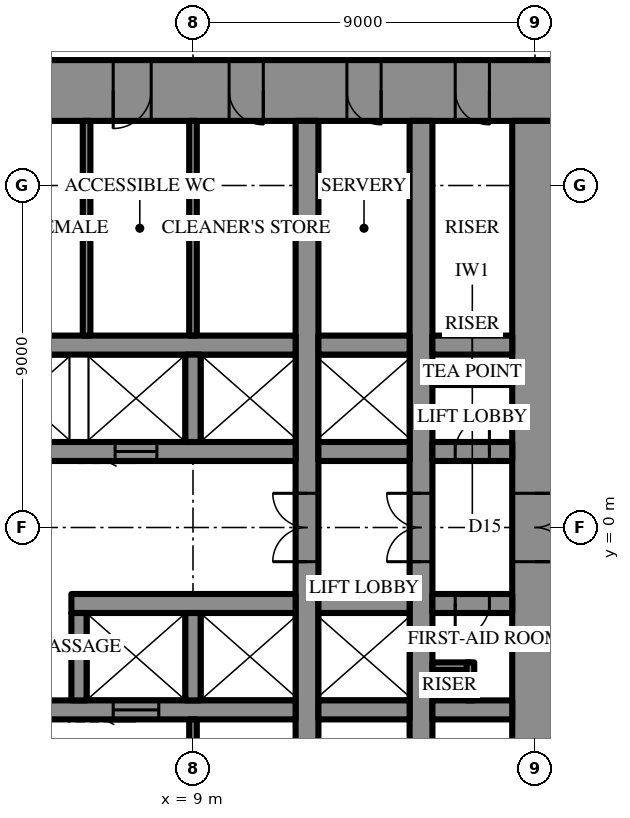
"""IFC4 building model, lengths in metres.
Left out: names, types, materials, properties, quantities, classifications, styles, units other than length and angle.
Written with IfcOpenShell. Run it as: python <this file> out.ifc"""

import sys

from ifc_helpers import new_model, si_unit, direction, frame, frame_2d, origin, place, context, subcontext, project, spatial, rectangle, extrude, element, fill, save


model = new_model("IFC4")
c1 = context("Model", 3, precision=1e-05, world=origin(), true_north=direction((0.0, 1.0)))
c2 = subcontext(c1, "Body", "Model", "MODEL_VIEW")
j1 = project(units=[si_unit("LENGTHUNIT", "METRE"), si_unit("PLANEANGLEUNIT", "RADIAN")], contexts=[c1])
p1 = place(None, origin())
s1 = spatial("IfcSite", under=j1, at=p1, CompositionType="ELEMENT")
p2 = place(p1, origin())
s2 = spatial("IfcBuilding", under=s1, at=p2, CompositionType="ELEMENT")
p3 = place(p2, frame((0.0, 0.0, 157.3)))
s3 = spatial("IfcBuildingStorey", under=s2, at=p3, CompositionType="ELEMENT", Elevation=157.3)
p4 = place(p3, frame((-18.6, 11.5, 0.0), z_axis=(0.0, 0.0, 1.0), x_axis=(1.0, 0.0, 0.0)))
e1 = element("IfcWall", 1, at=p4, inside=s3, PredefinedType="SHEAR", context=c2, shape_type="SweptSolid", body=[
    extrude(rectangle(XDim=37.2, YDim=1.6, at=frame_2d((18.6, 0.0))), origin(), (0.0, 0.0, 1.0), 4.2),
])
p5 = place(p4, frame((19.45, 0.0, 0.0)))
e2 = element("IfcOpeningElement", 2, at=p5, cuts=e1, PredefinedType="OPENING", context=c2, shape_type="SweptSolid", body=[
    extrude(rectangle(XDim=0.9, YDim=2.2, at=frame_2d((0.45, 1.1))), frame((0.0, 0.81, 0.0), z_axis=(0.0, -1.0, 0.0), x_axis=(1.0, 0.0, 0.0)), (0.0, 0.0, 1.0), 1.62),
])
p6 = place(p4, frame((22.45, 0.0, 0.0)))
e3 = element("IfcOpeningElement", 3, at=p6, cuts=e1, PredefinedType="OPENING", context=c2, shape_type="SweptSolid", body=[
    extrude(rectangle(XDim=0.9, YDim=2.2, at=frame_2d((0.45, 1.1))), frame((0.0, 0.81, 0.0), z_axis=(0.0, -1.0, 0.0), x_axis=(1.0, 0.0, 0.0)), (0.0, 0.0, 1.0), 1.62),
])
p7 = place(p4, frame((25.5, 0.0, 0.0)))
e4 = element("IfcOpeningElement", 4, at=p7, cuts=e1, PredefinedType="OPENING", context=c2, shape_type="SweptSolid", body=[
    extrude(rectangle(XDim=1.0, YDim=2.2, at=frame_2d((0.5, 1.1))), frame((0.0, 0.81, 0.0), z_axis=(0.0, -1.0, 0.0), x_axis=(1.0, 0.0, 0.0)), (0.0, 0.0, 1.0), 1.62),
])
p8 = place(p4, frame((1.8, 0.0, 0.0)))
e5 = element("IfcOpeningElement", 5, at=p8, cuts=e1, PredefinedType="OPENING", context=c2, shape_type="SweptSolid", body=[
    extrude(rectangle(XDim=0.9, YDim=2.2, at=frame_2d((0.45, 1.1))), frame((0.0, 0.81, 0.0), z_axis=(0.0, -1.0, 0.0), x_axis=(1.0, 0.0, 0.0)), (0.0, 0.0, 1.0), 1.62),
])
p9 = place(p4, frame((4.65, 0.0, 0.0)))
e6 = element("IfcOpeningElement", 6, at=p9, cuts=e1, PredefinedType="OPENING", context=c2, shape_type="SweptSolid", body=[
    extrude(rectangle(XDim=0.9, YDim=2.2, at=frame_2d((0.45, 1.1))), frame((0.0, 0.81, 0.0), z_axis=(0.0, -1.0, 0.0), x_axis=(1.0, 0.0, 0.0)), (0.0, 0.0, 1.0), 1.62),
])
p10 = place(p4, frame((7.75, 0.0, 0.0)))
e7 = element("IfcOpeningElement", 7, at=p10, cuts=e1, PredefinedType="OPENING", context=c2, shape_type="SweptSolid", body=[
    extrude(rectangle(XDim=0.9, YDim=2.2, at=frame_2d((0.45, 1.1))), frame((0.0, 0.81, 0.0), z_axis=(0.0, -1.0, 0.0), x_axis=(1.0, 0.0, 0.0)), (0.0, 0.0, 1.0), 1.62),
])
p11 = place(p4, frame((28.55, 0.0, 0.0)))
e8 = element("IfcOpeningElement", 8, at=p11, cuts=e1, PredefinedType="OPENING", context=c2, shape_type="SweptSolid", body=[
    extrude(rectangle(XDim=0.9, YDim=2.2, at=frame_2d((0.45, 1.1))), frame((0.0, 0.81, 0.0), z_axis=(0.0, -1.0, 0.0), x_axis=(1.0, 0.0, 0.0)), (0.0, 0.0, 1.0), 1.62),
])
p12 = place(p4, frame((31.65, 0.0, 0.0)))
e9 = element("IfcOpeningElement", 9, at=p12, cuts=e1, PredefinedType="OPENING", context=c2, shape_type="SweptSolid", body=[
    extrude(rectangle(XDim=0.9, YDim=2.2, at=frame_2d((0.45, 1.1))), frame((0.0, 0.81, 0.0), z_axis=(0.0, -1.0, 0.0), x_axis=(1.0, 0.0, 0.0)), (0.0, 0.0, 1.0), 1.62),
])
p13 = place(p4, frame((34.5, 0.0, 0.0)))
e10 = element("IfcOpeningElement", 10, at=p13, cuts=e1, PredefinedType="OPENING", context=c2, shape_type="SweptSolid", body=[
    extrude(rectangle(XDim=0.9, YDim=2.2, at=frame_2d((0.45, 1.1))), frame((0.0, 0.81, 0.0), z_axis=(0.0, -1.0, 0.0), x_axis=(1.0, 0.0, 0.0)), (0.0, 0.0, 1.0), 1.62),
])
p14 = place(p3, frame((18.0, -10.7, 0.0), z_axis=(0.0, 0.0, 1.0), x_axis=(0.0, 1.0, 0.0)))
e11 = element("IfcWall", 11, at=p14, inside=s3, PredefinedType="SHEAR", context=c2, shape_type="SweptSolid", body=[
    extrude(rectangle(XDim=21.4, YDim=1.2, at=frame_2d((10.7, 0.0))), origin(), (0.0, 0.0, 1.0), 4.2),
])
p15 = place(p14, frame((9.8, 0.0, 0.0)))
e12 = element("IfcOpeningElement", 12, at=p15, cuts=e11, PredefinedType="OPENING", context=c2, shape_type="SweptSolid", body=[
    extrude(rectangle(XDim=1.8, YDim=2.4, at=frame_2d((0.9, 1.2))), frame((0.0, 0.61, 0.0), z_axis=(0.0, -1.0, 0.0), x_axis=(1.0, 0.0, 0.0)), (0.0, 0.0, 1.0), 1.22),
])
p16 = place(p3, frame((12.0, -10.7, 0.0), z_axis=(0.0, 0.0, 1.0), x_axis=(0.0, 1.0, 0.0)))
e13 = element("IfcWall", 13, at=p16, inside=s3, PredefinedType="SHEAR", context=c2, shape_type="SweptSolid", body=[
    extrude(rectangle(XDim=21.4, YDim=0.6, at=frame_2d((10.7, 0.0))), origin(), (0.0, 0.0, 1.0), 4.2),
])
p17 = place(p16, frame((9.8, 0.0, 0.0)))
e14 = element("IfcOpeningElement", 14, at=p17, cuts=e13, PredefinedType="OPENING", context=c2, shape_type="SweptSolid", body=[
    extrude(rectangle(XDim=1.8, YDim=2.4, at=frame_2d((0.9, 1.2))), frame((0.0, 0.31, 0.0), z_axis=(0.0, -1.0, 0.0), x_axis=(1.0, 0.0, 0.0)), (0.0, 0.0, 1.0), 0.62),
])
p18 = place(p3, frame((15.0, -10.7, 0.0), z_axis=(0.0, 0.0, 1.0), x_axis=(0.0, 1.0, 0.0)))
e15 = element("IfcWall", 15, at=p18, inside=s3, PredefinedType="SHEAR", context=c2, shape_type="SweptSolid", body=[
    extrude(rectangle(XDim=21.4, YDim=0.6, at=frame_2d((10.7, 0.0))), origin(), (0.0, 0.0, 1.0), 4.2),
])
p19 = place(p18, frame((9.8, 0.0, 0.0)))
e16 = element("IfcOpeningElement", 16, at=p19, cuts=e15, PredefinedType="OPENING", context=c2, shape_type="SweptSolid", body=[
    extrude(rectangle(XDim=1.8, YDim=2.4, at=frame_2d((0.9, 1.2))), frame((0.0, 0.31, 0.0), z_axis=(0.0, -1.0, 0.0), x_axis=(1.0, 0.0, 0.0)), (0.0, 0.0, 1.0), 0.62),
])
p20 = place(p3, frame((-3.2, 2.0, 0.0), z_axis=(0.0, 0.0, 1.0), x_axis=(1.0, 0.0, 0.0)))
e17 = element("IfcWall", 17, at=p20, inside=s3, PredefinedType="SHEAR", context=c2, shape_type="SweptSolid", body=[
    extrude(rectangle(XDim=14.9, YDim=0.5, at=frame_2d((7.45, 0.0))), origin(), (0.0, 0.0, 1.0), 4.2),
])
p21 = place(p20, frame((1.15, 0.0, 0.0)))
e18 = element("IfcOpeningElement", 18, at=p21, cuts=e17, PredefinedType="OPENING", context=c2, shape_type="SweptSolid", body=[
    extrude(rectangle(XDim=1.1, YDim=2.2, at=frame_2d((0.55, 1.1))), frame((0.0, 0.26, 0.0), z_axis=(0.0, -1.0, 0.0), x_axis=(1.0, 0.0, 0.0)), (0.0, 0.0, 1.0), 0.52),
])
p22 = place(p20, frame((4.15, 0.0, 0.0)))
e19 = element("IfcOpeningElement", 19, at=p22, cuts=e17, PredefinedType="OPENING", context=c2, shape_type="SweptSolid", body=[
    extrude(rectangle(XDim=1.1, YDim=2.2, at=frame_2d((0.55, 1.1))), frame((0.0, 0.26, 0.0), z_axis=(0.0, -1.0, 0.0), x_axis=(1.0, 0.0, 0.0)), (0.0, 0.0, 1.0), 0.52),
])
p23 = place(p20, frame((7.15, 0.0, 0.0)))
e20 = element("IfcOpeningElement", 20, at=p23, cuts=e17, PredefinedType="OPENING", context=c2, shape_type="SweptSolid", body=[
    extrude(rectangle(XDim=1.1, YDim=2.2, at=frame_2d((0.55, 1.1))), frame((0.0, 0.26, 0.0), z_axis=(0.0, -1.0, 0.0), x_axis=(1.0, 0.0, 0.0)), (0.0, 0.0, 1.0), 0.52),
])
p24 = place(p20, frame((10.15, 0.0, 0.0)))
e21 = element("IfcOpeningElement", 21, at=p24, cuts=e17, PredefinedType="OPENING", context=c2, shape_type="SweptSolid", body=[
    extrude(rectangle(XDim=1.1, YDim=2.2, at=frame_2d((0.55, 1.1))), frame((0.0, 0.26, 0.0), z_axis=(0.0, -1.0, 0.0), x_axis=(1.0, 0.0, 0.0)), (0.0, 0.0, 1.0), 0.52),
])
p25 = place(p3, frame((12.3, 2.0, 0.0), z_axis=(0.0, 0.0, 1.0), x_axis=(1.0, 0.0, 0.0)))
e22 = element("IfcWall", 22, at=p25, inside=s3, PredefinedType="SHEAR", context=c2, shape_type="SweptSolid", body=[
    extrude(rectangle(XDim=2.4, YDim=0.5, at=frame_2d((1.2, 0.0))), origin(), (0.0, 0.0, 1.0), 4.2),
])
p26 = place(p3, frame((15.3, 2.0, 0.0), z_axis=(0.0, 0.0, 1.0), x_axis=(1.0, 0.0, 0.0)))
e23 = element("IfcWall", 23, at=p26, inside=s3, PredefinedType="SHEAR", context=c2, shape_type="SweptSolid", body=[
    extrude(rectangle(XDim=2.1, YDim=0.5, at=frame_2d((1.05, 0.0))), origin(), (0.0, 0.0, 1.0), 4.2),
])
p27 = place(p26, frame((0.6, 0.0, 0.0)))
e24 = element("IfcOpeningElement", 24, at=p27, cuts=e23, PredefinedType="OPENING", context=c2, shape_type="SweptSolid", body=[
    extrude(rectangle(XDim=0.9, YDim=2.2, at=frame_2d((0.45, 1.1))), frame((0.0, 0.26, 0.0), z_axis=(0.0, -1.0, 0.0), x_axis=(1.0, 0.0, 0.0)), (0.0, 0.0, 1.0), 0.52),
])
p28 = place(p3, frame((-11.7, 4.8, 0.0), z_axis=(0.0, 0.0, 1.0), x_axis=(1.0, 0.0, 0.0)))
e25 = element("IfcWall", 25, at=p28, inside=s3, PredefinedType="SHEAR", context=c2, shape_type="SweptSolid", body=[
    extrude(rectangle(XDim=23.4, YDim=0.5, at=frame_2d((11.7, 0.0))), origin(), (0.0, 0.0, 1.0), 4.2),
])
p29 = place(p28, frame((6.6, 0.0, 0.0)))
e26 = element("IfcOpeningElement", 26, at=p29, cuts=e25, PredefinedType="OPENING", context=c2, shape_type="SweptSolid", body=[
    extrude(rectangle(XDim=1.2, YDim=2.2, at=frame_2d((0.6, 1.1))), frame((0.0, 0.26, 0.0), z_axis=(0.0, -1.0, 0.0), x_axis=(1.0, 0.0, 0.0)), (0.0, 0.0, 1.0), 0.52),
])
p30 = place(p28, frame((3.6, 0.0, 0.0)))
e27 = element("IfcOpeningElement", 27, at=p30, cuts=e25, PredefinedType="OPENING", context=c2, shape_type="SweptSolid", body=[
    extrude(rectangle(XDim=1.2, YDim=2.2, at=frame_2d((0.6, 1.1))), frame((0.0, 0.26, 0.0), z_axis=(0.0, -1.0, 0.0), x_axis=(1.0, 0.0, 0.0)), (0.0, 0.0, 1.0), 0.52),
])
p31 = place(p3, frame((12.3, 4.8, 0.0), z_axis=(0.0, 0.0, 1.0), x_axis=(1.0, 0.0, 0.0)))
e28 = element("IfcWall", 28, at=p31, inside=s3, PredefinedType="SHEAR", context=c2, shape_type="SweptSolid", body=[
    extrude(rectangle(XDim=2.4, YDim=0.5, at=frame_2d((1.2, 0.0))), origin(), (0.0, 0.0, 1.0), 4.2),
])
p32 = place(p3, frame((15.3, 4.8, 0.0), z_axis=(0.0, 0.0, 1.0), x_axis=(1.0, 0.0, 0.0)))
e29 = element("IfcWall", 29, at=p32, inside=s3, PredefinedType="SHEAR", context=c2, shape_type="SweptSolid", body=[
    extrude(rectangle(XDim=2.1, YDim=0.5, at=frame_2d((1.05, 0.0))), origin(), (0.0, 0.0, 1.0), 4.2),
])
p33 = place(p3, frame((9.0, 2.25, 0.0), z_axis=(0.0, 0.0, 1.0), x_axis=(0.0, 1.0, 0.0)))
e30 = element("IfcWall", 30, at=p33, inside=s3, PredefinedType="SHEAR", context=c2, shape_type="SweptSolid", body=[
    extrude(rectangle(XDim=2.3, YDim=0.4, at=frame_2d((1.15, 0.0))), origin(), (0.0, 0.0, 1.0), 4.2),
])
p34 = place(p3, frame((17.4, -2.0, 0.0), z_axis=(0.0, 0.0, 1.0), x_axis=(-1.0, 0.0, 0.0)))
e31 = element("IfcWall", 31, at=p34, inside=s3, PredefinedType="SHEAR", context=c2, shape_type="SweptSolid", body=[
    extrude(rectangle(XDim=2.1, YDim=0.5, at=frame_2d((1.05, 0.0))), origin(), (0.0, 0.0, 1.0), 4.2),
])
p35 = place(p34, frame((0.6, 0.0, 0.0)))
e32 = element("IfcOpeningElement", 32, at=p35, cuts=e31, PredefinedType="OPENING", context=c2, shape_type="SweptSolid", body=[
    extrude(rectangle(XDim=0.9, YDim=2.2, at=frame_2d((0.45, 1.1))), frame((0.0, 0.26, 0.0), z_axis=(0.0, -1.0, 0.0), x_axis=(1.0, 0.0, 0.0)), (0.0, 0.0, 1.0), 0.52),
])
p36 = place(p3, frame((14.7, -2.0, 0.0), z_axis=(0.0, 0.0, 1.0), x_axis=(-1.0, 0.0, 0.0)))
e33 = element("IfcWall", 33, at=p36, inside=s3, PredefinedType="SHEAR", context=c2, shape_type="SweptSolid", body=[
    extrude(rectangle(XDim=2.4, YDim=0.5, at=frame_2d((1.2, 0.0))), origin(), (0.0, 0.0, 1.0), 4.2),
])
p37 = place(p3, frame((11.7, -2.0, 0.0), z_axis=(0.0, 0.0, 1.0), x_axis=(-1.0, 0.0, 0.0)))
e34 = element("IfcWall", 34, at=p37, inside=s3, PredefinedType="SHEAR", context=c2, shape_type="SweptSolid", body=[
    extrude(rectangle(XDim=5.9, YDim=0.5, at=frame_2d((2.95, 0.0))), origin(), (0.0, 0.0, 1.0), 4.2),
])
p38 = place(p3, frame((17.4, -4.8, 0.0), z_axis=(0.0, 0.0, 1.0), x_axis=(-1.0, 0.0, 0.0)))
e35 = element("IfcWall", 35, at=p38, inside=s3, PredefinedType="SHEAR", context=c2, shape_type="SweptSolid", body=[
    extrude(rectangle(XDim=2.1, YDim=0.5, at=frame_2d((1.05, 0.0))), origin(), (0.0, 0.0, 1.0), 4.2),
])
p39 = place(p3, frame((14.7, -4.8, 0.0), z_axis=(0.0, 0.0, 1.0), x_axis=(-1.0, 0.0, 0.0)))
e36 = element("IfcWall", 36, at=p39, inside=s3, PredefinedType="SHEAR", context=c2, shape_type="SweptSolid", body=[
    extrude(rectangle(XDim=2.4, YDim=0.5, at=frame_2d((1.2, 0.0))), origin(), (0.0, 0.0, 1.0), 4.2),
])
p40 = place(p3, frame((11.7, -4.8, 0.0), z_axis=(0.0, 0.0, 1.0), x_axis=(-1.0, 0.0, 0.0)))
e37 = element("IfcWall", 37, at=p40, inside=s3, PredefinedType="SHEAR", context=c2, shape_type="SweptSolid", body=[
    extrude(rectangle(XDim=23.4, YDim=0.5, at=frame_2d((11.7, 0.0))), origin(), (0.0, 0.0, 1.0), 4.2),
])
p41 = place(p40, frame((6.6, 0.0, 0.0)))
e38 = element("IfcOpeningElement", 38, at=p41, cuts=e37, PredefinedType="OPENING", context=c2, shape_type="SweptSolid", body=[
    extrude(rectangle(XDim=1.2, YDim=2.2, at=frame_2d((0.6, 1.1))), frame((0.0, 0.26, 0.0), z_axis=(0.0, -1.0, 0.0), x_axis=(1.0, 0.0, 0.0)), (0.0, 0.0, 1.0), 0.52),
])
p42 = place(p40, frame((3.6, 0.0, 0.0)))
e39 = element("IfcOpeningElement", 39, at=p42, cuts=e37, PredefinedType="OPENING", context=c2, shape_type="SweptSolid", body=[
    extrude(rectangle(XDim=1.2, YDim=2.2, at=frame_2d((0.6, 1.1))), frame((0.0, 0.26, 0.0), z_axis=(0.0, -1.0, 0.0), x_axis=(1.0, 0.0, 0.0)), (0.0, 0.0, 1.0), 0.52),
])
for number, where, z_axis, x_axis in (
    (40, (9.0, -2.25, 0.0), (0.0, 0.0, 1.0), (0.0, -1.0, 0.0)),
    (41, (6.0, -2.25, 0.0), (0.0, 0.0, 1.0), (0.0, -1.0, 0.0)),
):
    element("IfcWall", number, at=place(p3, frame(where, z_axis=z_axis, x_axis=x_axis)), inside=s3, PredefinedType="SHEAR", context=c2, shape_type="SweptSolid", body=[
        extrude(rectangle(XDim=2.3, YDim=0.4, at=frame_2d((1.15, 0.0))), origin(), (0.0, 0.0, 1.0), 4.2),
    ])
for number, where, z_axis, x_axis in (
    (42, (9.0, 5.05, 0.0), (0.0, 0.0, 1.0), (0.0, 1.0, 0.0)),
    (43, (6.2, 5.05, 0.0), (0.0, 0.0, 1.0), (0.0, 1.0, 0.0)),
    (44, (9.0, -5.05, 0.0), (0.0, 0.0, 1.0), (0.0, -1.0, 0.0)),
):
    element("IfcWall", number, at=place(p3, frame(where, z_axis=z_axis, x_axis=x_axis)), inside=s3, PredefinedType="PARTITIONING", context=c2, shape_type="SweptSolid", body=[
        extrude(rectangle(XDim=5.65, YDim=0.2, at=frame_2d((2.825, 0.0))), origin(), (0.0, 0.0, 1.0), 4.0),
    ])
p43 = place(p3, frame((15.3, 3.85, 0.0), z_axis=(0.0, 0.0, 1.0), x_axis=(1.0, 0.0, 0.0)))
e45 = element("IfcWall", 45, at=p43, inside=s3, PredefinedType="PARTITIONING", context=c2, shape_type="SweptSolid", body=[
    extrude(rectangle(XDim=2.1, YDim=0.2, at=frame_2d((1.05, 0.0))), origin(), (0.0, 0.0, 1.0), 4.0),
])
for number, where, z_axis, x_axis in (
    (46, (16.3, -3.65, 0.0), (0.0, 0.0, 1.0), (-1.0, 0.0, 0.0)),
    (47, (16.3, -3.55, 0.0), (0.0, 0.0, 1.0), (0.0, -1.0, 0.0)),
):
    element("IfcWall", number, at=place(p3, frame(where, z_axis=z_axis, x_axis=x_axis)), inside=s3, PredefinedType="PARTITIONING", context=c2, shape_type="SweptSolid", body=[
        extrude(rectangle(XDim=1.0, YDim=0.2, at=frame_2d((0.5, 0.0))), origin(), (0.0, 0.0, 1.0), 4.0),
    ])
p44 = place(p15, frame((1.8, 0.0, 0.0), z_axis=(0.0, 0.0, 1.0), x_axis=(-1.0, 0.0, 0.0)))
e48 = element("IfcDoor", 48, at=p44, inside=s3, OperationType="DOUBLE_DOOR_SINGLE_SWING", PredefinedType="DOOR", context=c2, shape_type="SweptSolid", body=[
    extrude(rectangle(XDim=1.8, YDim=2.4, at=frame_2d((0.9, 1.2))), frame((0.0, 0.025, 0.0), z_axis=(0.0, -1.0, 0.0), x_axis=(1.0, 0.0, 0.0)), (0.0, 0.0, 1.0), 0.05),
])
fill(e12, e48)
p45 = place(p7, frame((1.0, 0.0, 0.0), z_axis=(0.0, 0.0, 1.0), x_axis=(-1.0, 0.0, 0.0)))
e49 = element("IfcDoor", 49, at=p45, inside=s3, OperationType="SINGLE_SWING_LEFT", PredefinedType="DOOR", context=c2, shape_type="SweptSolid", body=[
    extrude(rectangle(XDim=1.0, YDim=2.2, at=frame_2d((0.5, 1.1))), frame((0.0, 0.025, 0.0), z_axis=(0.0, -1.0, 0.0), x_axis=(1.0, 0.0, 0.0)), (0.0, 0.0, 1.0), 0.05),
])
fill(e4, e49)
p46 = place(p11, frame((0.9, 0.0, 0.0), z_axis=(0.0, 0.0, 1.0), x_axis=(-1.0, 0.0, 0.0)))
e50 = element("IfcDoor", 50, at=p46, inside=s3, OperationType="SINGLE_SWING_RIGHT", PredefinedType="DOOR", context=c2, shape_type="SweptSolid", body=[
    extrude(rectangle(XDim=0.9, YDim=2.2, at=frame_2d((0.45, 1.1))), frame((0.0, 0.025, 0.0), z_axis=(0.0, -1.0, 0.0), x_axis=(1.0, 0.0, 0.0)), (0.0, 0.0, 1.0), 0.05),
])
fill(e8, e50)
p47 = place(p12, frame((0.9, 0.0, 0.0), z_axis=(0.0, 0.0, 1.0), x_axis=(-1.0, 0.0, 0.0)))
e51 = element("IfcDoor", 51, at=p47, inside=s3, OperationType="SINGLE_SWING_RIGHT", PredefinedType="DOOR", context=c2, shape_type="SweptSolid", body=[
    extrude(rectangle(XDim=0.9, YDim=2.2, at=frame_2d((0.45, 1.1))), frame((0.0, 0.025, 0.0), z_axis=(0.0, -1.0, 0.0), x_axis=(1.0, 0.0, 0.0)), (0.0, 0.0, 1.0), 0.05),
])
fill(e9, e51)
p48 = place(p13, frame((0.9, 0.0, 0.0), z_axis=(0.0, 0.0, 1.0), x_axis=(-1.0, 0.0, 0.0)))
e52 = element("IfcDoor", 52, at=p48, inside=s3, OperationType="SINGLE_SWING_RIGHT", PredefinedType="DOOR", context=c2, shape_type="SweptSolid", body=[
    extrude(rectangle(XDim=0.9, YDim=2.2, at=frame_2d((0.45, 1.1))), frame((0.0, 0.025, 0.0), z_axis=(0.0, -1.0, 0.0), x_axis=(1.0, 0.0, 0.0)), (0.0, 0.0, 1.0), 0.05),
])
fill(e10, e52)
p49 = place(p27, origin())
e53 = element("IfcDoor", 53, at=p49, inside=s3, OperationType="SINGLE_SWING_LEFT", PredefinedType="DOOR", context=c2, shape_type="SweptSolid", body=[
    extrude(rectangle(XDim=0.9, YDim=2.2, at=frame_2d((0.45, 1.1))), frame((0.0, 0.025, 0.0), z_axis=(0.0, -1.0, 0.0), x_axis=(1.0, 0.0, 0.0)), (0.0, 0.0, 1.0), 0.05),
])
fill(e24, e53)
p50 = place(p35, origin())
e54 = element("IfcDoor", 54, at=p50, inside=s3, OperationType="SINGLE_SWING_LEFT", PredefinedType="DOOR", context=c2, shape_type="SweptSolid", body=[
    extrude(rectangle(XDim=0.9, YDim=2.2, at=frame_2d((0.45, 1.1))), frame((0.0, 0.025, 0.0), z_axis=(0.0, -1.0, 0.0), x_axis=(1.0, 0.0, 0.0)), (0.0, 0.0, 1.0), 0.05),
])
fill(e32, e54)
p51 = place(p17, origin())
e55 = element("IfcDoor", 55, at=p51, inside=s3, OperationType="DOUBLE_DOOR_SINGLE_SWING", PredefinedType="DOOR", context=c2, shape_type="SweptSolid", body=[
    extrude(rectangle(XDim=1.8, YDim=2.4, at=frame_2d((0.9, 1.2))), frame((0.0, 0.025, 0.0), z_axis=(0.0, -1.0, 0.0), x_axis=(1.0, 0.0, 0.0)), (0.0, 0.0, 1.0), 0.05),
])
fill(e14, e55)
p52 = place(p19, origin())
e56 = element("IfcDoor", 56, at=p52, inside=s3, OperationType="DOUBLE_DOOR_SINGLE_SWING", PredefinedType="DOOR", context=c2, shape_type="SweptSolid", body=[
    extrude(rectangle(XDim=1.8, YDim=2.4, at=frame_2d((0.9, 1.2))), frame((0.0, 0.025, 0.0), z_axis=(0.0, -1.0, 0.0), x_axis=(1.0, 0.0, 0.0)), (0.0, 0.0, 1.0), 0.05),
])
fill(e16, e56)
p53 = place(p24, frame((1.1, 0.0, 0.0), z_axis=(0.0, 0.0, 1.0), x_axis=(-1.0, 0.0, 0.0)))
e57 = element("IfcDoor", 57, at=p53, inside=s3, OperationType="SLIDING_TO_LEFT", PredefinedType="DOOR", context=c2, shape_type="SweptSolid", body=[
    extrude(rectangle(XDim=1.1, YDim=2.2, at=frame_2d((0.55, 1.1))), frame((0.0, 0.025, 0.0), z_axis=(0.0, -1.0, 0.0), x_axis=(1.0, 0.0, 0.0)), (0.0, 0.0, 1.0), 0.05),
])
fill(e21, e57)
p54 = place(p42, origin())
e58 = element("IfcDoor", 58, at=p54, inside=s3, OperationType="SLIDING_TO_LEFT", PredefinedType="DOOR", context=c2, shape_type="SweptSolid", body=[
    extrude(rectangle(XDim=1.2, YDim=2.2, at=frame_2d((0.6, 1.1))), frame((0.0, 0.025, 0.0), z_axis=(0.0, -1.0, 0.0), x_axis=(1.0, 0.0, 0.0)), (0.0, 0.0, 1.0), 0.05),
])
fill(e39, e58)
save(model, sys.argv[1])
